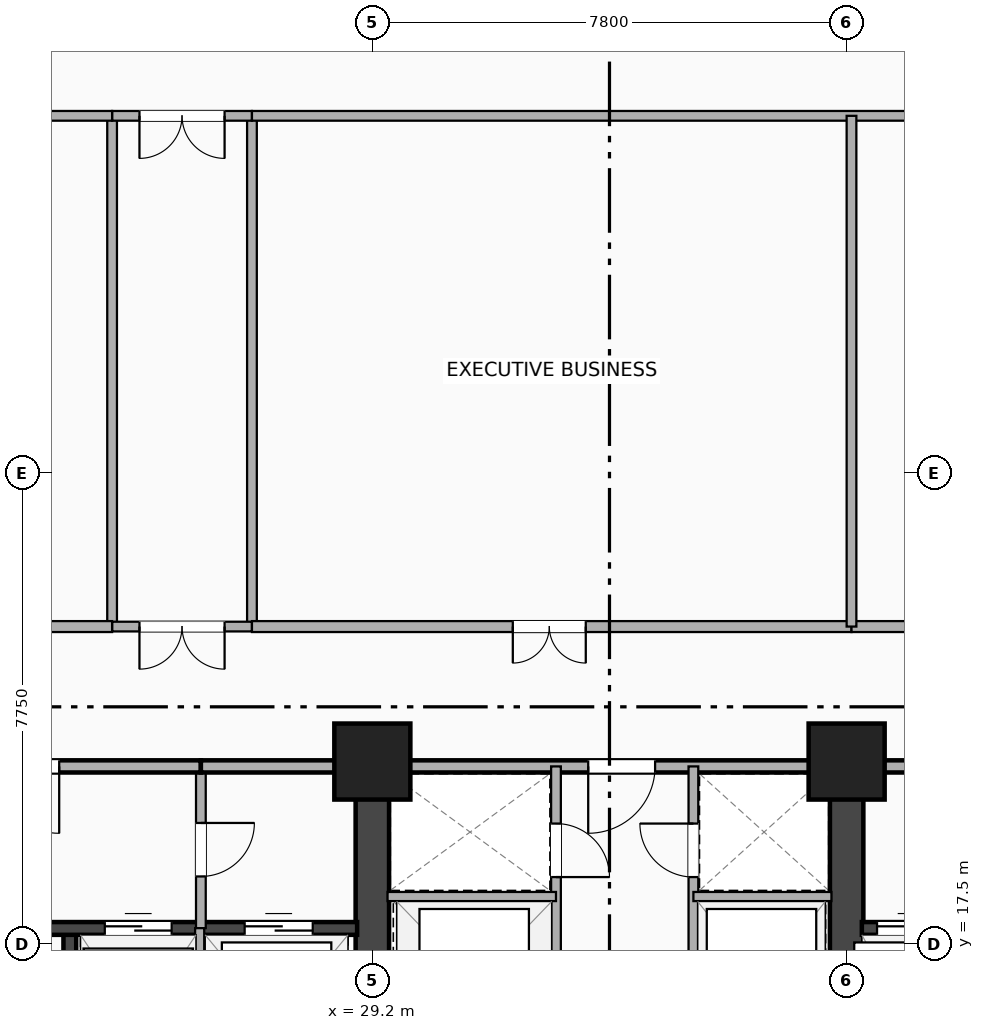
"""IFC4 building model, lengths in metres.
Left out: names, types, materials, properties, quantities, classifications, styles, units other than length and angle.
Written with IfcOpenShell. Run it as: python <this file> out.ifc"""

import sys

from ifc_helpers import new_model, si_unit, direction, frame, frame_2d, origin, origin_2d, place, context, subcontext, project, spatial, rectangle, extrude, element, fill, save


model = new_model("IFC4")
c1 = context("Model", 3, precision=1e-05, world=origin(), true_north=direction((0.0, 1.0)))
c2 = subcontext(c1, "Body", "Model", "MODEL_VIEW")
j1 = project(units=[si_unit("LENGTHUNIT", "METRE"), si_unit("PLANEANGLEUNIT", "RADIAN")], contexts=[c1])
p1 = place(None, origin())
s1 = spatial("IfcSite", under=j1, at=p1, CompositionType="ELEMENT")
p2 = place(p1, origin())
s2 = spatial("IfcBuilding", under=s1, at=p2, CompositionType="ELEMENT")
p3 = place(p2, frame((0.0, 0.0, 83.8)))
s3 = spatial("IfcBuildingStorey", under=s2, at=p3, CompositionType="ELEMENT", Elevation=83.8)
p4 = place(p3, frame((29.2, 3.5, 0.0), z_axis=(0.0, 0.0, 1.0), x_axis=(0.0, 1.0, 0.0)))
e1 = element("IfcWall", 1, at=p4, inside=s3, PredefinedType="SHEAR", context=c2, shape_type="SweptSolid", body=[
    extrude(rectangle(XDim=16.9, YDim=0.55, at=frame_2d((8.45, 0.0))), origin(), (0.0, 0.0, 1.0), 4.14),
])
p5 = place(p4, frame((7.75, 0.0, 0.0), z_axis=(0.0, 0.0, 1.0), x_axis=(-1.0, 0.0, 0.0)))
e2 = element("IfcOpeningElement", 2, at=p5, cuts=e1, PredefinedType="OPENING", context=c2, shape_type="SweptSolid", body=[
    extrude(rectangle(XDim=1.1, YDim=2.15, at=frame_2d((0.55, 1.075))), frame((0.0, 0.285, 0.0), z_axis=(0.0, -1.0, 0.0), x_axis=(1.0, 0.0, 0.0)), (0.0, 0.0, 1.0), 0.57),
])
p6 = place(p3, frame((37.0, 3.5, 0.0), z_axis=(0.0, 0.0, 1.0), x_axis=(0.0, 1.0, 0.0)))
e3 = element("IfcWall", 3, at=p6, inside=s3, PredefinedType="SHEAR", context=c2, shape_type="SweptSolid", body=[
    extrude(rectangle(XDim=16.9, YDim=0.55, at=frame_2d((8.45, 0.0))), origin(), (0.0, 0.0, 1.0), 4.14),
])
p7 = place(p6, frame((6.65, 0.0, 0.0)))
e4 = element("IfcOpeningElement", 4, at=p7, cuts=e3, PredefinedType="OPENING", context=c2, shape_type="SweptSolid", body=[
    extrude(rectangle(XDim=1.1, YDim=2.15, at=frame_2d((0.55, 1.075))), frame((0.0, 0.285, 0.0), z_axis=(0.0, -1.0, 0.0), x_axis=(1.0, 0.0, 0.0)), (0.0, 0.0, 1.0), 0.57),
])
p8 = place(p3, frame((24.225, 9.745, 0.0), z_axis=(0.0, 0.0, 1.0), x_axis=(0.0, 1.0, 0.0)))
e5 = element("IfcWall", 5, at=p8, inside=s3, PredefinedType="SHEAR", context=c2, shape_type="SweptSolid", body=[
    extrude(rectangle(XDim=8.01, YDim=0.21, at=frame_2d((4.005, 0.0))), origin(), (0.0, 0.0, 1.0), 4.14),
])
p9 = place(p3, frame((20.65, 17.755, 0.0), z_axis=(0.0, 0.0, 1.0), x_axis=(1.0, 0.0, 0.0)))
e6 = element("IfcWall", 6, at=p9, inside=s3, PredefinedType="SHEAR", context=c2, shape_type="SweptSolid", body=[
    extrude(rectangle(XDim=8.3, YDim=0.21, at=frame_2d((4.15, 0.0))), origin(), (0.0, 0.0, 1.0), 4.14),
])
p10 = place(p9, frame((2.2, 0.0, 0.0), z_axis=(0.0, 0.0, 1.0), x_axis=(-1.0, 0.0, 0.0)))
e7 = element("IfcOpeningElement", 7, at=p10, cuts=e6, PredefinedType="OPENING", context=c2, shape_type="SweptSolid", body=[
    extrude(rectangle(XDim=1.05, YDim=2.15, at=frame_2d((0.525, 1.075))), frame((0.0, 0.115, 0.0), z_axis=(0.0, -1.0, 0.0), x_axis=(1.0, 0.0, 0.0)), (0.0, 0.0, 1.0), 0.23),
])
p11 = place(p9, frame((4.15, 0.0, 0.0)))
e8 = element("IfcOpeningElement", 8, at=p11, cuts=e6, PredefinedType="OPENING", context=c2, shape_type="SweptSolid", body=[
    extrude(rectangle(XDim=1.1, YDim=2.18, at=frame_2d((0.55, 1.09))), frame((0.0, 0.115, 0.0), z_axis=(0.0, -1.0, 0.0), x_axis=(1.0, 0.0, 0.0)), (0.0, 0.0, 1.0), 0.23),
])
p12 = place(p9, frame((6.45, 0.0, 0.0)))
e9 = element("IfcOpeningElement", 9, at=p12, cuts=e6, PredefinedType="OPENING", context=c2, shape_type="SweptSolid", body=[
    extrude(rectangle(XDim=1.12, YDim=2.2, at=frame_2d((0.56, 1.1))), frame((0.0, 0.115, 0.0), z_axis=(0.0, -1.0, 0.0), x_axis=(1.0, 0.0, 0.0)), (0.0, 0.0, 1.0), 0.23),
])
p13 = place(p3, frame((37.25, 17.755, 0.0), z_axis=(0.0, 0.0, 1.0), x_axis=(1.0, 0.0, 0.0)))
e10 = element("IfcWall", 10, at=p13, inside=s3, PredefinedType="SHEAR", context=c2, shape_type="SweptSolid", body=[
    extrude(rectangle(XDim=7.2, YDim=0.21, at=frame_2d((3.6, 0.0))), origin(), (0.0, 0.0, 1.0), 4.14),
])
p14 = place(p13, frame((0.25, 0.0, 0.0)))
e11 = element("IfcOpeningElement", 11, at=p14, cuts=e10, PredefinedType="OPENING", context=c2, shape_type="SweptSolid", body=[
    extrude(rectangle(XDim=1.12, YDim=2.2, at=frame_2d((0.56, 1.1))), frame((0.0, 0.115, 0.0), z_axis=(0.0, -1.0, 0.0), x_axis=(1.0, 0.0, 0.0)), (0.0, 0.0, 1.0), 0.23),
])
p15 = place(p13, frame((2.05, 0.0, 0.0)))
e12 = element("IfcOpeningElement", 12, at=p15, cuts=e10, PredefinedType="OPENING", context=c2, shape_type="SweptSolid", body=[
    extrude(rectangle(XDim=1.1, YDim=2.18, at=frame_2d((0.55, 1.09))), frame((0.0, 0.115, 0.0), z_axis=(0.0, -1.0, 0.0), x_axis=(1.0, 0.0, 0.0)), (0.0, 0.0, 1.0), 0.23),
])
p16 = place(p13, frame((5.78, 0.0, 0.0), z_axis=(0.0, 0.0, 1.0), x_axis=(-1.0, 0.0, 0.0)))
e13 = element("IfcOpeningElement", 13, at=p16, cuts=e10, PredefinedType="OPENING", context=c2, shape_type="SweptSolid", body=[
    extrude(rectangle(XDim=1.05, YDim=2.15, at=frame_2d((0.525, 1.075))), frame((0.0, 0.115, 0.0), z_axis=(0.0, -1.0, 0.0), x_axis=(1.0, 0.0, 0.0)), (0.0, 0.0, 1.0), 0.23),
])
for number, where, z_axis, x_axis in (
    (14, (29.2, 20.5, -0.26), (0.0, 0.0, 1.0), (1.0, 0.0, 0.0)),
    (15, (37.0, 20.5, -0.26), (0.0, 0.0, 1.0), (1.0, 0.0, 0.0)),
):
    element("IfcColumn", number, at=place(p3, frame(where, z_axis=z_axis, x_axis=x_axis)), inside=s3, PredefinedType="COLUMN", context=c2, shape_type="SweptSolid", body=[
        extrude(rectangle(XDim=1.25, YDim=1.25, at=origin_2d()), origin(), (0.0, 0.0, 1.0), 4.4),
    ])
p17 = place(p3, frame((26.38, 17.76, 0.0), z_axis=(0.0, 0.0, 1.0), x_axis=(0.0, 1.0, 0.0)))
e16 = element("IfcWall", 16, at=p17, inside=s3, PredefinedType="PARTITIONING", context=c2, shape_type="SweptSolid", body=[
    extrude(rectangle(XDim=2.66, YDim=0.16, at=frame_2d((1.33, 0.0))), origin(), (0.0, 0.0, 1.0), 3.514),
])
p18 = place(p17, frame((0.85, 0.0, 0.0)))
e17 = element("IfcOpeningElement", 17, at=p18, cuts=e16, PredefinedType="OPENING", context=c2, shape_type="SweptSolid", body=[
    extrude(rectangle(XDim=0.88, YDim=2.08, at=frame_2d((0.44, 1.04))), frame((0.0, 0.09, 0.0), z_axis=(0.0, -1.0, 0.0), x_axis=(1.0, 0.0, 0.0)), (0.0, 0.0, 1.0), 0.18),
])
p19 = place(p3, frame((26.36, 14.72, 0.0), z_axis=(0.0, 0.0, 1.0), x_axis=(0.0, 1.0, 0.0)))
e18 = element("IfcWall", 18, at=p19, inside=s3, PredefinedType="PARTITIONING", context=c2, shape_type="SweptSolid", body=[
    extrude(rectangle(XDim=3.04, YDim=0.15, at=frame_2d((1.52, 0.0))), origin(), (0.0, 0.0, 1.0), 4.14),
])
p20 = place(p3, frame((20.65, 20.42, 0.0), z_axis=(0.0, 0.0, 1.0), x_axis=(1.0, 0.0, 0.0)))
e19 = element("IfcWall", 19, at=p20, inside=s3, PredefinedType="PARTITIONING", context=c2, shape_type="SweptSolid", body=[
    extrude(rectangle(XDim=5.73, YDim=0.2, at=frame_2d((2.865, 0.0))), origin(), (0.0, 0.0, 1.0), 3.213),
])
p21 = place(p20, frame((2.3, 0.0, 0.0)))
e20 = element("IfcOpeningElement", 20, at=p21, cuts=e19, PredefinedType="OPENING", context=c2, shape_type="SweptSolid", body=[
    extrude(rectangle(XDim=1.1, YDim=2.15, at=frame_2d((0.55, 1.075))), frame((0.0, 0.11, 0.0), z_axis=(0.0, -1.0, 0.0), x_axis=(1.0, 0.0, 0.0)), (0.0, 0.0, 1.0), 0.22),
])
p22 = place(p3, frame((26.38, 20.42, 0.0), z_axis=(0.0, 0.0, 1.0), x_axis=(1.0, 0.0, 0.0)))
e21 = element("IfcWall", 21, at=p22, inside=s3, PredefinedType="PARTITIONING", context=c2, shape_type="SweptSolid", body=[
    extrude(rectangle(XDim=2.82, YDim=0.2, at=frame_2d((1.41, 0.0))), origin(), (0.0, 0.0, 1.0), 3.213),
])
p23 = place(p3, frame((29.2, 20.42, 0.0), z_axis=(0.0, 0.0, 1.0), x_axis=(1.0, 0.0, 0.0)))
e22 = element("IfcWall", 22, at=p23, inside=s3, PredefinedType="PARTITIONING", context=c2, shape_type="SweptSolid", body=[
    extrude(rectangle(XDim=7.8, YDim=0.2, at=frame_2d((3.9, 0.0))), origin(), (0.0, 0.0, 1.0), 3.213),
])
p24 = place(p23, frame((3.55, 0.0, 0.0)))
e23 = element("IfcOpeningElement", 23, at=p24, cuts=e22, PredefinedType="OPENING", context=c2, shape_type="SweptSolid", body=[
    extrude(rectangle(XDim=1.1, YDim=2.15, at=frame_2d((0.55, 1.075))), frame((0.0, 0.11, 0.0), z_axis=(0.0, -1.0, 0.0), x_axis=(1.0, 0.0, 0.0)), (0.0, 0.0, 1.0), 0.22),
])
p25 = place(p3, frame((37.0, 20.42, 0.0), z_axis=(0.0, 0.0, 1.0), x_axis=(1.0, 0.0, 0.0)))
e24 = element("IfcWall", 24, at=p25, inside=s3, PredefinedType="PARTITIONING", context=c2, shape_type="SweptSolid", body=[
    extrude(rectangle(XDim=7.45, YDim=0.2, at=frame_2d((3.725, 0.0))), origin(), (0.0, 0.0, 1.0), 3.213),
])
p26 = place(p25, frame((4.2, 0.0, 0.0)))
e25 = element("IfcOpeningElement", 25, at=p26, cuts=e24, PredefinedType="OPENING", context=c2, shape_type="SweptSolid", body=[
    extrude(rectangle(XDim=1.1, YDim=2.15, at=frame_2d((0.55, 1.075))), frame((0.0, 0.11, 0.0), z_axis=(0.0, -1.0, 0.0), x_axis=(1.0, 0.0, 0.0)), (0.0, 0.0, 1.0), 0.22),
])
p27 = place(p3, frame((32.22, 12.5, 0.0), z_axis=(0.0, 0.0, 1.0), x_axis=(0.0, 1.0, 0.0)))
e26 = element("IfcWall", 26, at=p27, inside=s3, PredefinedType="PARTITIONING", context=c2, shape_type="SweptSolid", body=[
    extrude(rectangle(XDim=7.92, YDim=0.16, at=frame_2d((3.96, 0.0))), origin(), (0.0, 0.0, 1.0), 3.514),
])
p28 = place(p27, frame((1.43, 0.0, 0.0), z_axis=(0.0, 0.0, 1.0), x_axis=(-1.0, 0.0, 0.0)))
e27 = element("IfcOpeningElement", 27, at=p28, cuts=e26, PredefinedType="OPENING", context=c2, shape_type="SweptSolid", body=[
    extrude(rectangle(XDim=1.08, YDim=2.16, at=frame_2d((0.54, 1.08))), frame((0.0, 0.09, 0.0), z_axis=(0.0, -1.0, 0.0), x_axis=(1.0, 0.0, 0.0)), (0.0, 0.0, 1.0), 0.18),
])
p29 = place(p27, frame((4.33, 0.0, 0.0), z_axis=(0.0, 0.0, 1.0), x_axis=(-1.0, 0.0, 0.0)))
e28 = element("IfcOpeningElement", 28, at=p29, cuts=e26, PredefinedType="OPENING", context=c2, shape_type="SweptSolid", body=[
    extrude(rectangle(XDim=1.08, YDim=2.16, at=frame_2d((0.54, 1.08))), frame((0.0, 0.09, 0.0), z_axis=(0.0, -1.0, 0.0), x_axis=(1.0, 0.0, 0.0)), (0.0, 0.0, 1.0), 0.18),
])
p30 = place(p27, frame((6.1, 0.0, 0.0)))
e29 = element("IfcOpeningElement", 29, at=p30, cuts=e26, PredefinedType="OPENING", context=c2, shape_type="SweptSolid", body=[
    extrude(rectangle(XDim=0.88, YDim=2.08, at=frame_2d((0.44, 1.04))), frame((0.0, 0.09, 0.0), z_axis=(0.0, -1.0, 0.0), x_axis=(1.0, 0.0, 0.0)), (0.0, 0.0, 1.0), 0.18),
])
p31 = place(p3, frame((34.48, 12.5, 0.0), z_axis=(0.0, 0.0, 1.0), x_axis=(0.0, 1.0, 0.0)))
e30 = element("IfcWall", 30, at=p31, inside=s3, PredefinedType="PARTITIONING", context=c2, shape_type="SweptSolid", body=[
    extrude(rectangle(XDim=7.92, YDim=0.16, at=frame_2d((3.96, 0.0))), origin(), (0.0, 0.0, 1.0), 3.514),
])
p32 = place(p31, frame((0.35, 0.0, 0.0)))
e31 = element("IfcOpeningElement", 31, at=p32, cuts=e30, PredefinedType="OPENING", context=c2, shape_type="SweptSolid", body=[
    extrude(rectangle(XDim=1.08, YDim=2.16, at=frame_2d((0.54, 1.08))), frame((0.0, 0.09, 0.0), z_axis=(0.0, -1.0, 0.0), x_axis=(1.0, 0.0, 0.0)), (0.0, 0.0, 1.0), 0.18),
])
p33 = place(p31, frame((3.25, 0.0, 0.0)))
e32 = element("IfcOpeningElement", 32, at=p33, cuts=e30, PredefinedType="OPENING", context=c2, shape_type="SweptSolid", body=[
    extrude(rectangle(XDim=1.08, YDim=2.16, at=frame_2d((0.54, 1.08))), frame((0.0, 0.09, 0.0), z_axis=(0.0, -1.0, 0.0), x_axis=(1.0, 0.0, 0.0)), (0.0, 0.0, 1.0), 0.18),
])
p34 = place(p31, frame((6.98, 0.0, 0.0), z_axis=(0.0, 0.0, 1.0), x_axis=(-1.0, 0.0, 0.0)))
e33 = element("IfcOpeningElement", 33, at=p34, cuts=e30, PredefinedType="OPENING", context=c2, shape_type="SweptSolid", body=[
    extrude(rectangle(XDim=0.88, YDim=2.08, at=frame_2d((0.44, 1.04))), frame((0.0, 0.09, 0.0), z_axis=(0.0, -1.0, 0.0), x_axis=(1.0, 0.0, 0.0)), (0.0, 0.0, 1.0), 0.18),
])
p35 = place(p3, frame((29.45, 18.28, 0.0), z_axis=(0.0, 0.0, 1.0), x_axis=(1.0, 0.0, 0.0)))
e34 = element("IfcWall", 34, at=p35, inside=s3, PredefinedType="PARTITIONING", context=c2, shape_type="SweptSolid", body=[
    extrude(rectangle(XDim=2.77, YDim=0.15, at=frame_2d((1.385, 0.0))), origin(), (0.0, 0.0, 1.0), 4.14),
])
p36 = place(p3, frame((34.48, 18.28, 0.0), z_axis=(0.0, 0.0, 1.0), x_axis=(1.0, 0.0, 0.0)))
e35 = element("IfcWall", 35, at=p36, inside=s3, PredefinedType="PARTITIONING", context=c2, shape_type="SweptSolid", body=[
    extrude(rectangle(XDim=2.27, YDim=0.15, at=frame_2d((1.135, 0.0))), origin(), (0.0, 0.0, 1.0), 4.14),
])
for number, where, z_axis, x_axis in (
    (36, (24.92, 22.72, 0.0), (0.0, 0.0, 1.0), (0.0, 1.0, 0.0)),
    (37, (27.22, 22.72, 0.0), (0.0, 0.0, 1.0), (0.0, 1.0, 0.0)),
):
    element("IfcWall", number, at=place(p3, frame(where, z_axis=z_axis, x_axis=x_axis)), inside=s3, PredefinedType="PARTITIONING", context=c2, shape_type="SweptSolid", body=[
        extrude(rectangle(XDim=8.4, YDim=0.16, at=frame_2d((4.2, 0.0))), origin(), (0.0, 0.0, 1.0), 3.718),
    ])
p37 = place(p3, frame((24.92, 22.72, 0.0), z_axis=(0.0, 0.0, 1.0), x_axis=(1.0, 0.0, 0.0)))
e38 = element("IfcWall", 38, at=p37, inside=s3, PredefinedType="PARTITIONING", context=c2, shape_type="SweptSolid", body=[
    extrude(rectangle(XDim=2.3, YDim=0.16, at=frame_2d((1.15, 0.0))), origin(), (0.0, 0.0, 1.0), 4.14),
])
p38 = place(p37, frame((0.45, 0.0, 0.0)))
e39 = element("IfcOpeningElement", 39, at=p38, cuts=e38, PredefinedType="OPENING", context=c2, shape_type="SweptSolid", body=[
    extrude(rectangle(XDim=1.4, YDim=2.2, at=frame_2d((0.7, 1.1))), frame((0.0, 0.09, 0.0), z_axis=(0.0, -1.0, 0.0), x_axis=(1.0, 0.0, 0.0)), (0.0, 0.0, 1.0), 0.18),
])
p39 = place(p3, frame((24.92, 31.12, 0.0), z_axis=(0.0, 0.0, 1.0), x_axis=(1.0, 0.0, 0.0)))
e40 = element("IfcWall", 40, at=p39, inside=s3, PredefinedType="PARTITIONING", context=c2, shape_type="SweptSolid", body=[
    extrude(rectangle(XDim=2.3, YDim=0.16, at=frame_2d((1.15, 0.0))), origin(), (0.0, 0.0, 1.0), 4.14),
])
p40 = place(p39, frame((0.45, 0.0, 0.0)))
e41 = element("IfcOpeningElement", 41, at=p40, cuts=e40, PredefinedType="OPENING", context=c2, shape_type="SweptSolid", body=[
    extrude(rectangle(XDim=1.4, YDim=2.2, at=frame_2d((0.7, 1.1))), frame((0.0, 0.09, 0.0), z_axis=(0.0, -1.0, 0.0), x_axis=(1.0, 0.0, 0.0)), (0.0, 0.0, 1.0), 0.18),
])
p41 = place(p3, frame((11.47, 31.12, 0.0), z_axis=(0.0, 0.0, 1.0), x_axis=(1.0, 0.0, 0.0)))
e42 = element("IfcWall", 42, at=p41, inside=s3, PredefinedType="PARTITIONING", context=c2, shape_type="SweptSolid", body=[
    extrude(rectangle(XDim=13.45, YDim=0.16, at=frame_2d((6.725, 0.0))), origin(), (0.0, 0.0, 1.0), 3.213),
])
p42 = place(p3, frame((27.22, 31.12, 0.0), z_axis=(0.0, 0.0, 1.0), x_axis=(1.0, 0.0, 0.0)))
e43 = element("IfcWall", 43, at=p42, inside=s3, PredefinedType="PARTITIONING", context=c2, shape_type="SweptSolid", body=[
    extrude(rectangle(XDim=31.66, YDim=0.16, at=frame_2d((15.83, 0.0))), origin(), (0.0, 0.0, 1.0), 3.213),
])
p43 = place(p3, frame((18.02, 22.72, 0.0), z_axis=(0.0, 0.0, 1.0), x_axis=(1.0, 0.0, 0.0)))
e44 = element("IfcWall", 44, at=p43, inside=s3, PredefinedType="PARTITIONING", context=c2, shape_type="SweptSolid", body=[
    extrude(rectangle(XDim=6.9, YDim=0.18, at=frame_2d((3.45, 0.0))), origin(), (0.0, 0.0, 1.0), 3.213),
])
p44 = place(p43, frame((3.8, 0.0, 0.0)))
e45 = element("IfcOpeningElement", 45, at=p44, cuts=e44, PredefinedType="OPENING", context=c2, shape_type="SweptSolid", body=[
    extrude(rectangle(XDim=1.2, YDim=2.14, at=frame_2d((0.6, 1.07))), frame((0.0, 0.1, 0.0), z_axis=(0.0, -1.0, 0.0), x_axis=(1.0, 0.0, 0.0)), (0.0, 0.0, 1.0), 0.2),
])
p45 = place(p3, frame((27.22, 22.72, 0.0), z_axis=(0.0, 0.0, 1.0), x_axis=(1.0, 0.0, 0.0)))
e46 = element("IfcWall", 46, at=p45, inside=s3, PredefinedType="PARTITIONING", context=c2, shape_type="SweptSolid", body=[
    extrude(rectangle(XDim=9.86, YDim=0.18, at=frame_2d((4.93, 0.0))), origin(), (0.0, 0.0, 1.0), 3.213),
])
p46 = place(p45, frame((4.29, 0.0, 0.0)))
e47 = element("IfcOpeningElement", 47, at=p46, cuts=e46, PredefinedType="OPENING", context=c2, shape_type="SweptSolid", body=[
    extrude(rectangle(XDim=1.2, YDim=2.14, at=frame_2d((0.6, 1.07))), frame((0.0, 0.1, 0.0), z_axis=(0.0, -1.0, 0.0), x_axis=(1.0, 0.0, 0.0)), (0.0, 0.0, 1.0), 0.2),
])
p47 = place(p3, frame((37.08, 22.72, 0.0), z_axis=(0.0, 0.0, 1.0), x_axis=(1.0, 0.0, 0.0)))
e48 = element("IfcWall", 48, at=p47, inside=s3, PredefinedType="PARTITIONING", context=c2, shape_type="SweptSolid", body=[
    extrude(rectangle(XDim=7.8, YDim=0.18, at=frame_2d((3.9, 0.0))), origin(), (0.0, 0.0, 1.0), 3.213),
])
p48 = place(p47, frame((3.39, 0.0, 0.0)))
e49 = element("IfcOpeningElement", 49, at=p48, cuts=e48, PredefinedType="OPENING", context=c2, shape_type="SweptSolid", body=[
    extrude(rectangle(XDim=0.95, YDim=2.15, at=frame_2d((0.475, 1.075))), frame((0.0, 0.1, 0.0), z_axis=(0.0, -1.0, 0.0), x_axis=(1.0, 0.0, 0.0)), (0.0, 0.0, 1.0), 0.2),
])
p49 = place(p3, frame((37.08, 22.72, 0.0), z_axis=(0.0, 0.0, 1.0), x_axis=(0.0, 1.0, 0.0)))
e50 = element("IfcWall", 50, at=p49, inside=s3, PredefinedType="PARTITIONING", context=c2, shape_type="SweptSolid", body=[
    extrude(rectangle(XDim=8.4, YDim=0.16, at=frame_2d((4.2, 0.0))), origin(), (0.0, 0.0, 1.0), 3.213),
])
p50 = place(p11, origin())
e51 = element("IfcDoor", 51, at=p50, inside=s3, OperationType="DOUBLE_DOOR_SLIDING", PredefinedType="DOOR", context=c2, shape_type="SweptSolid", body=[
    extrude(rectangle(XDim=1.1, YDim=2.18, at=frame_2d((0.55, 1.09))), frame((0.0, 0.025, 0.0), z_axis=(0.0, -1.0, 0.0), x_axis=(1.0, 0.0, 0.0)), (0.0, 0.0, 1.0), 0.05),
])
fill(e8, e51)
p51 = place(p12, origin())
e52 = element("IfcDoor", 52, at=p51, inside=s3, OperationType="DOUBLE_DOOR_SLIDING", PredefinedType="DOOR", context=c2, shape_type="SweptSolid", body=[
    extrude(rectangle(XDim=1.12, YDim=2.2, at=frame_2d((0.56, 1.1))), frame((0.0, 0.025, 0.0), z_axis=(0.0, -1.0, 0.0), x_axis=(1.0, 0.0, 0.0)), (0.0, 0.0, 1.0), 0.05),
])
fill(e9, e52)
p52 = place(p14, origin())
e53 = element("IfcDoor", 53, at=p52, inside=s3, OperationType="DOUBLE_DOOR_SLIDING", PredefinedType="DOOR", context=c2, shape_type="SweptSolid", body=[
    extrude(rectangle(XDim=1.12, YDim=2.2, at=frame_2d((0.56, 1.1))), frame((0.0, 0.025, 0.0), z_axis=(0.0, -1.0, 0.0), x_axis=(1.0, 0.0, 0.0)), (0.0, 0.0, 1.0), 0.05),
])
fill(e11, e53)
p53 = place(p18, origin())
e54 = element("IfcDoor", 54, at=p53, inside=s3, OperationType="SINGLE_SWING_RIGHT", PredefinedType="DOOR", context=c2, shape_type="SweptSolid", body=[
    extrude(rectangle(XDim=0.88, YDim=2.08, at=frame_2d((0.44, 1.04))), frame((0.0, 0.025, 0.0), z_axis=(0.0, -1.0, 0.0), x_axis=(1.0, 0.0, 0.0)), (0.0, 0.0, 1.0), 0.05),
])
fill(e17, e54)
p54 = place(p21, origin())
e55 = element("IfcDoor", 55, at=p54, inside=s3, OperationType="SINGLE_SWING_RIGHT", PredefinedType="DOOR", context=c2, shape_type="SweptSolid", body=[
    extrude(rectangle(XDim=1.1, YDim=2.15, at=frame_2d((0.55, 1.075))), frame((0.0, 0.025, 0.0), z_axis=(0.0, -1.0, 0.0), x_axis=(1.0, 0.0, 0.0)), (0.0, 0.0, 1.0), 0.05),
])
fill(e20, e55)
p55 = place(p24, origin())
e56 = element("IfcDoor", 56, at=p55, inside=s3, OperationType="SINGLE_SWING_LEFT", PredefinedType="DOOR", context=c2, shape_type="SweptSolid", body=[
    extrude(rectangle(XDim=1.1, YDim=2.15, at=frame_2d((0.55, 1.075))), frame((0.0, 0.025, 0.0), z_axis=(0.0, -1.0, 0.0), x_axis=(1.0, 0.0, 0.0)), (0.0, 0.0, 1.0), 0.05),
])
fill(e23, e56)
p56 = place(p30, origin())
e57 = element("IfcDoor", 57, at=p56, inside=s3, OperationType="SINGLE_SWING_LEFT", PredefinedType="DOOR", context=c2, shape_type="SweptSolid", body=[
    extrude(rectangle(XDim=0.88, YDim=2.08, at=frame_2d((0.44, 1.04))), frame((0.0, 0.025, 0.0), z_axis=(0.0, -1.0, 0.0), x_axis=(1.0, 0.0, 0.0)), (0.0, 0.0, 1.0), 0.05),
])
fill(e29, e57)
p57 = place(p34, origin())
e58 = element("IfcDoor", 58, at=p57, inside=s3, OperationType="SINGLE_SWING_RIGHT", PredefinedType="DOOR", context=c2, shape_type="SweptSolid", body=[
    extrude(rectangle(XDim=0.88, YDim=2.08, at=frame_2d((0.44, 1.04))), frame((0.0, 0.025, 0.0), z_axis=(0.0, -1.0, 0.0), x_axis=(1.0, 0.0, 0.0)), (0.0, 0.0, 1.0), 0.05),
])
fill(e33, e58)
p58 = place(p38, origin())
e59 = element("IfcDoor", 59, at=p58, inside=s3, OperationType="DOUBLE_DOOR_SINGLE_SWING", PredefinedType="DOOR", context=c2, shape_type="SweptSolid", body=[
    extrude(rectangle(XDim=1.4, YDim=2.2, at=frame_2d((0.7, 1.1))), frame((0.0, 0.025, 0.0), z_axis=(0.0, -1.0, 0.0), x_axis=(1.0, 0.0, 0.0)), (0.0, 0.0, 1.0), 0.05),
])
fill(e39, e59)
p59 = place(p40, origin())
e60 = element("IfcDoor", 60, at=p59, inside=s3, OperationType="DOUBLE_DOOR_SINGLE_SWING", PredefinedType="DOOR", context=c2, shape_type="SweptSolid", body=[
    extrude(rectangle(XDim=1.4, YDim=2.2, at=frame_2d((0.7, 1.1))), frame((0.0, 0.025, 0.0), z_axis=(0.0, -1.0, 0.0), x_axis=(1.0, 0.0, 0.0)), (0.0, 0.0, 1.0), 0.05),
])
fill(e41, e60)
p60 = place(p46, origin())
e61 = element("IfcDoor", 61, at=p60, inside=s3, OperationType="DOUBLE_DOOR_SINGLE_SWING", PredefinedType="DOOR", context=c2, shape_type="SweptSolid", body=[
    extrude(rectangle(XDim=1.2, YDim=2.14, at=frame_2d((0.6, 1.07))), frame((0.0, 0.025, 0.0), z_axis=(0.0, -1.0, 0.0), x_axis=(1.0, 0.0, 0.0)), (0.0, 0.0, 1.0), 0.05),
])
fill(e47, e61)
save(model, sys.argv[1])
